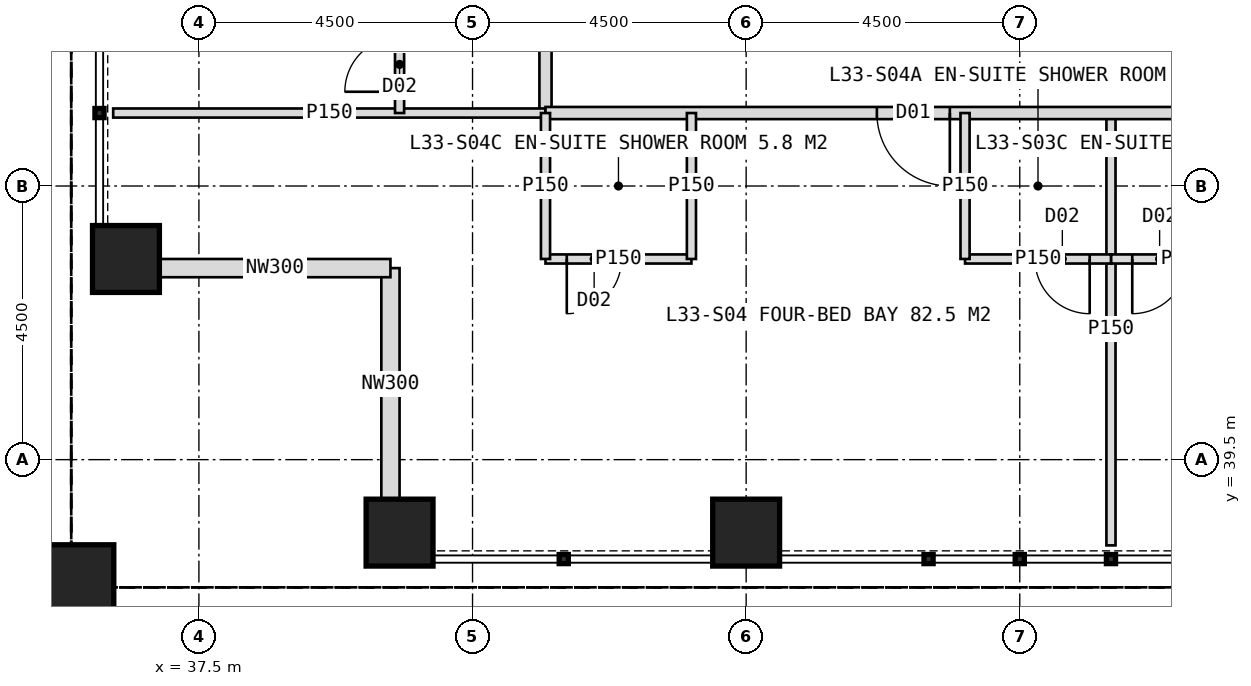
"""IFC4 building model, lengths in metres.
Left out: names, types, materials, properties, quantities, classifications, styles, units other than length and angle.
Written with IfcOpenShell. Run it as: python <this file> out.ifc"""

import sys

from ifc_helpers import new_model, si_unit, direction, frame, frame_2d, origin, origin_2d, place, context, subcontext, project, spatial, rectangle, hollow_rectangle, extrude, element, fill, save


model = new_model("IFC4")
c1 = context("Model", 3, precision=1e-05, world=origin(), true_north=direction((0.0, 1.0)))
c2 = subcontext(c1, "Body", "Model", "MODEL_VIEW")
j1 = project(units=[si_unit("LENGTHUNIT", "METRE"), si_unit("PLANEANGLEUNIT", "RADIAN")], contexts=[c1])
p1 = place(None, origin())
s1 = spatial("IfcSite", under=j1, at=p1, CompositionType="ELEMENT")
p2 = place(p1, origin())
s2 = spatial("IfcBuilding", under=s1, at=p2, CompositionType="ELEMENT")
p3 = place(p2, frame((0.0, 0.0, 140.0)))
s3 = spatial("IfcBuildingStorey", under=s2, at=p3, CompositionType="ELEMENT", Elevation=140.0)
for number, where, z_axis, x_axis in (
    (1, (40.8, 38.3, 0.0), (0.0, 0.0, 1.0), (1.0, 0.0, 0.0)),
    (2, (36.3, 42.8, 0.0), (0.0, 0.0, 1.0), (1.0, 0.0, 0.0)),
    (3, (46.5, 38.3, 0.0), (0.0, 0.0, 1.0), (1.0, 0.0, 0.0)),
):
    element("IfcColumn", number, at=place(p3, frame(where, z_axis=z_axis, x_axis=x_axis)), inside=s3, PredefinedType="COLUMN", context=c2, shape_type="SweptSolid", body=[
        extrude(hollow_rectangle(XDim=1.1, YDim=1.1, WallThickness=0.1, at=origin_2d()), origin(), (0.0, 0.0, 1.0), 4.0),
    ])
p4 = place(p3, frame((35.4, 37.4, 0.0), z_axis=(0.0, 0.0, 1.0), x_axis=(1.0, 0.0, 0.0)))
e4 = element("IfcColumn", 4, at=p4, inside=s3, PredefinedType="COLUMN", context=c2, shape_type="SweptSolid", body=[
    extrude(hollow_rectangle(XDim=1.4, YDim=1.4, WallThickness=0.08, at=origin_2d()), origin(), (0.0, 0.0, 1.0), 4.0),
])
for number, where, z_axis, x_axis in (
    (5, (40.65, 38.85, 0.0), (0.0, 0.0, 1.0), (0.0, 1.0, 0.0)),
    (6, (40.65, 42.65, 0.0), (0.0, 0.0, 1.0), (-1.0, 0.0, 0.0)),
):
    element("IfcWall", number, at=place(p3, frame(where, z_axis=z_axis, x_axis=x_axis)), inside=s3, PredefinedType="ELEMENTEDWALL", context=c2, shape_type="SweptSolid", body=[
        extrude(rectangle(XDim=3.8, YDim=0.3, at=frame_2d((1.9, 0.0))), origin(), (0.0, 0.0, 1.0), 4.0),
    ])
p5 = place(p3, frame((43.2, 45.2, 0.0), z_axis=(0.0, 0.0, 1.0), x_axis=(0.0, 1.0, 0.0)))
e7 = element("IfcWall", 7, at=p5, inside=s3, PredefinedType="PARTITIONING", context=c2, shape_type="SweptSolid", body=[
    extrude(rectangle(XDim=33.6, YDim=0.2, at=frame_2d((16.8, 0.0))), origin(), (0.0, 0.0, 1.0), 3.75),
])
p6 = place(p5, frame((2.65, 0.0, 0.0)))
e8 = element("IfcOpeningElement", 8, at=p6, cuts=e7, PredefinedType="OPENING", context=c2, shape_type="SweptSolid", body=[
    extrude(rectangle(XDim=1.2, YDim=2.2, at=frame_2d((0.6, 1.1))), frame((0.0, 0.11, 0.0), z_axis=(0.0, -1.0, 0.0), x_axis=(1.0, 0.0, 0.0)), (0.0, 0.0, 1.0), 0.22),
])
p7 = place(p5, frame((8.95, 0.0, 0.0)))
e9 = element("IfcOpeningElement", 9, at=p7, cuts=e7, PredefinedType="OPENING", context=c2, shape_type="SweptSolid", body=[
    extrude(rectangle(XDim=1.2, YDim=2.2, at=frame_2d((0.6, 1.1))), frame((0.0, 0.11, 0.0), z_axis=(0.0, -1.0, 0.0), x_axis=(1.0, 0.0, 0.0)), (0.0, 0.0, 1.0), 0.22),
])
p8 = place(p5, frame((19.45, 0.0, 0.0)))
e10 = element("IfcOpeningElement", 10, at=p8, cuts=e7, PredefinedType="OPENING", context=c2, shape_type="SweptSolid", body=[
    extrude(rectangle(XDim=1.2, YDim=2.2, at=frame_2d((0.6, 1.1))), frame((0.0, 0.11, 0.0), z_axis=(0.0, -1.0, 0.0), x_axis=(1.0, 0.0, 0.0)), (0.0, 0.0, 1.0), 0.22),
])
p9 = place(p5, frame((28.45, 0.0, 0.0)))
e11 = element("IfcOpeningElement", 11, at=p9, cuts=e7, PredefinedType="OPENING", context=c2, shape_type="SweptSolid", body=[
    extrude(rectangle(XDim=1.2, YDim=2.2, at=frame_2d((0.6, 1.1))), frame((0.0, 0.11, 0.0), z_axis=(0.0, -1.0, 0.0), x_axis=(1.0, 0.0, 0.0)), (0.0, 0.0, 1.0), 0.22),
])
p10 = place(p3, frame((43.2, 45.2, 0.0), z_axis=(0.0, 0.0, 1.0), x_axis=(-1.0, 0.0, 0.0)))
e12 = element("IfcWall", 12, at=p10, inside=s3, PredefinedType="PARTITIONING", context=c2, shape_type="SweptSolid", body=[
    extrude(rectangle(XDim=7.11, YDim=0.15, at=frame_2d((3.555, 0.0))), origin(), (0.0, 0.0, 1.0), 3.75),
])
p11 = place(p3, frame((40.8, 45.2, 0.0), z_axis=(0.0, 0.0, 1.0), x_axis=(0.0, 1.0, 0.0)))
e13 = element("IfcWall", 13, at=p11, inside=s3, PredefinedType="PARTITIONING", context=c2, shape_type="SweptSolid", body=[
    extrude(rectangle(XDim=2.4, YDim=0.15, at=frame_2d((1.2, 0.0))), origin(), (0.0, 0.0, 1.0), 2.997),
])
p12 = place(p11, frame((0.35, 0.0, 0.0)))
e14 = element("IfcOpeningElement", 14, at=p12, cuts=e13, PredefinedType="OPENING", context=c2, shape_type="SweptSolid", body=[
    extrude(rectangle(XDim=0.9, YDim=2.1, at=frame_2d((0.45, 1.05))), frame((0.0, 0.085, 0.0), z_axis=(0.0, -1.0, 0.0), x_axis=(1.0, 0.0, 0.0)), (0.0, 0.0, 1.0), 0.17),
])
p13 = place(p3, frame((52.5, 45.2, 0.0), z_axis=(0.0, 0.0, 1.0), x_axis=(0.0, -1.0, 0.0)))
e15 = element("IfcWall", 15, at=p13, inside=s3, PredefinedType="PARTITIONING", context=c2, shape_type="SweptSolid", body=[
    extrude(rectangle(XDim=7.11, YDim=0.15, at=frame_2d((3.555, 0.0))), origin(), (0.0, 0.0, 1.0), 3.75),
])
p14 = place(p3, frame((76.8, 45.2, 0.0), z_axis=(0.0, 0.0, 1.0), x_axis=(-1.0, 0.0, 0.0)))
e16 = element("IfcWall", 16, at=p14, inside=s3, PredefinedType="PARTITIONING", context=c2, shape_type="SweptSolid", body=[
    extrude(rectangle(XDim=33.6, YDim=0.2, at=frame_2d((16.8, 0.0))), origin(), (0.0, 0.0, 1.0), 3.75),
])
p15 = place(p14, frame((2.65, 0.0, 0.0)))
e17 = element("IfcOpeningElement", 17, at=p15, cuts=e16, PredefinedType="OPENING", context=c2, shape_type="SweptSolid", body=[
    extrude(rectangle(XDim=1.2, YDim=2.2, at=frame_2d((0.6, 1.1))), frame((0.0, 0.11, 0.0), z_axis=(0.0, -1.0, 0.0), x_axis=(1.0, 0.0, 0.0)), (0.0, 0.0, 1.0), 0.22),
])
p16 = place(p14, frame((11.05, 0.0, 0.0)))
e18 = element("IfcOpeningElement", 18, at=p16, cuts=e16, PredefinedType="OPENING", context=c2, shape_type="SweptSolid", body=[
    extrude(rectangle(XDim=1.2, YDim=2.2, at=frame_2d((0.6, 1.1))), frame((0.0, 0.11, 0.0), z_axis=(0.0, -1.0, 0.0), x_axis=(1.0, 0.0, 0.0)), (0.0, 0.0, 1.0), 0.22),
])
p17 = place(p14, frame((17.95, 0.0, 0.0)))
e19 = element("IfcOpeningElement", 19, at=p17, cuts=e16, PredefinedType="OPENING", context=c2, shape_type="SweptSolid", body=[
    extrude(rectangle(XDim=1.2, YDim=2.2, at=frame_2d((0.6, 1.1))), frame((0.0, 0.11, 0.0), z_axis=(0.0, -1.0, 0.0), x_axis=(1.0, 0.0, 0.0)), (0.0, 0.0, 1.0), 0.22),
])
p18 = place(p14, frame((26.95, 0.0, 0.0)))
e20 = element("IfcOpeningElement", 20, at=p18, cuts=e16, PredefinedType="OPENING", context=c2, shape_type="SweptSolid", body=[
    extrude(rectangle(XDim=1.2, YDim=2.2, at=frame_2d((0.6, 1.1))), frame((0.0, 0.11, 0.0), z_axis=(0.0, -1.0, 0.0), x_axis=(1.0, 0.0, 0.0)), (0.0, 0.0, 1.0), 0.22),
])
p19 = place(p3, frame((54.9, 42.8, 0.0), z_axis=(0.0, 0.0, 1.0), x_axis=(-1.0, 0.0, 0.0)))
e21 = element("IfcWall", 21, at=p19, inside=s3, PredefinedType="PARTITIONING", context=c2, shape_type="SweptSolid", body=[
    extrude(rectangle(XDim=2.4, YDim=0.15, at=frame_2d((1.2, 0.0))), origin(), (0.0, 0.0, 1.0), 3.75),
])
p20 = place(p19, frame((1.15, 0.0, 0.0)))
e22 = element("IfcOpeningElement", 22, at=p20, cuts=e21, PredefinedType="OPENING", context=c2, shape_type="SweptSolid", body=[
    extrude(rectangle(XDim=0.9, YDim=2.1, at=frame_2d((0.45, 1.05))), frame((0.0, 0.085, 0.0), z_axis=(0.0, -1.0, 0.0), x_axis=(1.0, 0.0, 0.0)), (0.0, 0.0, 1.0), 0.17),
])
p21 = place(p3, frame((52.5, 42.8, 0.0), z_axis=(0.0, 0.0, 1.0), x_axis=(-1.0, 0.0, 0.0)))
e23 = element("IfcWall", 23, at=p21, inside=s3, PredefinedType="PARTITIONING", context=c2, shape_type="SweptSolid", body=[
    extrude(rectangle(XDim=2.4, YDim=0.15, at=frame_2d((1.2, 0.0))), origin(), (0.0, 0.0, 1.0), 3.75),
])
p22 = place(p21, frame((0.35, 0.0, 0.0)))
e24 = element("IfcOpeningElement", 24, at=p22, cuts=e23, PredefinedType="OPENING", context=c2, shape_type="SweptSolid", body=[
    extrude(rectangle(XDim=0.9, YDim=2.1, at=frame_2d((0.45, 1.05))), frame((0.0, 0.085, 0.0), z_axis=(0.0, -1.0, 0.0), x_axis=(1.0, 0.0, 0.0)), (0.0, 0.0, 1.0), 0.17),
])
p23 = place(p3, frame((50.1, 45.2, 0.0), z_axis=(0.0, 0.0, 1.0), x_axis=(0.0, -1.0, 0.0)))
e25 = element("IfcWall", 25, at=p23, inside=s3, PredefinedType="PARTITIONING", context=c2, shape_type="SweptSolid", body=[
    extrude(rectangle(XDim=2.4, YDim=0.15, at=frame_2d((1.2, 0.0))), origin(), (0.0, 0.0, 1.0), 3.75),
])
p24 = place(p3, frame((45.6, 42.8, 0.0), z_axis=(0.0, 0.0, 1.0), x_axis=(-1.0, 0.0, 0.0)))
e26 = element("IfcWall", 26, at=p24, inside=s3, PredefinedType="PARTITIONING", context=c2, shape_type="SweptSolid", body=[
    extrude(rectangle(XDim=2.4, YDim=0.15, at=frame_2d((1.2, 0.0))), origin(), (0.0, 0.0, 1.0), 2.997),
])
p25 = place(p24, frame((1.15, 0.0, 0.0)))
e27 = element("IfcOpeningElement", 27, at=p25, cuts=e26, PredefinedType="OPENING", context=c2, shape_type="SweptSolid", body=[
    extrude(rectangle(XDim=0.9, YDim=2.1, at=frame_2d((0.45, 1.05))), frame((0.0, 0.085, 0.0), z_axis=(0.0, -1.0, 0.0), x_axis=(1.0, 0.0, 0.0)), (0.0, 0.0, 1.0), 0.17),
])
for number, where, z_axis, x_axis in (
    (28, (45.6, 45.2, 0.0), (0.0, 0.0, 1.0), (0.0, -1.0, 0.0)),
    (29, (43.2, 45.2, 0.0), (0.0, 0.0, 1.0), (0.0, -1.0, 0.0)),
):
    element("IfcWall", number, at=place(p3, frame(where, z_axis=z_axis, x_axis=x_axis)), inside=s3, PredefinedType="PARTITIONING", context=c2, shape_type="SweptSolid", body=[
        extrude(rectangle(XDim=2.4, YDim=0.15, at=frame_2d((1.2, 0.0))), origin(), (0.0, 0.0, 1.0), 3.75),
    ])
p26 = place(p12, origin())
e30 = element("IfcDoor", 30, at=p26, inside=s3, OperationType="SINGLE_SWING_LEFT", PredefinedType="DOOR", context=c2, shape_type="SweptSolid", body=[
    extrude(rectangle(XDim=0.9, YDim=2.1, at=frame_2d((0.45, 1.05))), frame((0.0, 0.025, 0.0), z_axis=(0.0, -1.0, 0.0), x_axis=(1.0, 0.0, 0.0)), (0.0, 0.0, 1.0), 0.05),
])
fill(e14, e30)
p27 = place(p20, origin())
e31 = element("IfcDoor", 31, at=p27, inside=s3, OperationType="SINGLE_SWING_RIGHT", PredefinedType="DOOR", context=c2, shape_type="SweptSolid", body=[
    extrude(rectangle(XDim=0.9, YDim=2.1, at=frame_2d((0.45, 1.05))), frame((0.0, 0.025, 0.0), z_axis=(0.0, -1.0, 0.0), x_axis=(1.0, 0.0, 0.0)), (0.0, 0.0, 1.0), 0.05),
])
fill(e22, e31)
p28 = place(p18, origin())
e32 = element("IfcDoor", 32, at=p28, inside=s3, OperationType="SINGLE_SWING_LEFT", PredefinedType="DOOR", context=c2, shape_type="SweptSolid", body=[
    extrude(rectangle(XDim=1.2, YDim=2.2, at=frame_2d((0.6, 1.1))), frame((0.0, 0.025, 0.0), z_axis=(0.0, -1.0, 0.0), x_axis=(1.0, 0.0, 0.0)), (0.0, 0.0, 1.0), 0.05),
])
fill(e20, e32)
p29 = place(p22, origin())
e33 = element("IfcDoor", 33, at=p29, inside=s3, OperationType="SINGLE_SWING_LEFT", PredefinedType="DOOR", context=c2, shape_type="SweptSolid", body=[
    extrude(rectangle(XDim=0.9, YDim=2.1, at=frame_2d((0.45, 1.05))), frame((0.0, 0.025, 0.0), z_axis=(0.0, -1.0, 0.0), x_axis=(1.0, 0.0, 0.0)), (0.0, 0.0, 1.0), 0.05),
])
fill(e24, e33)
p30 = place(p25, origin())
e34 = element("IfcDoor", 34, at=p30, inside=s3, OperationType="SINGLE_SWING_RIGHT", PredefinedType="DOOR", context=c2, shape_type="SweptSolid", body=[
    extrude(rectangle(XDim=0.9, YDim=2.1, at=frame_2d((0.45, 1.05))), frame((0.0, 0.025, 0.0), z_axis=(0.0, -1.0, 0.0), x_axis=(1.0, 0.0, 0.0)), (0.0, 0.0, 1.0), 0.05),
])
fill(e27, e34)
save(model, sys.argv[1])
